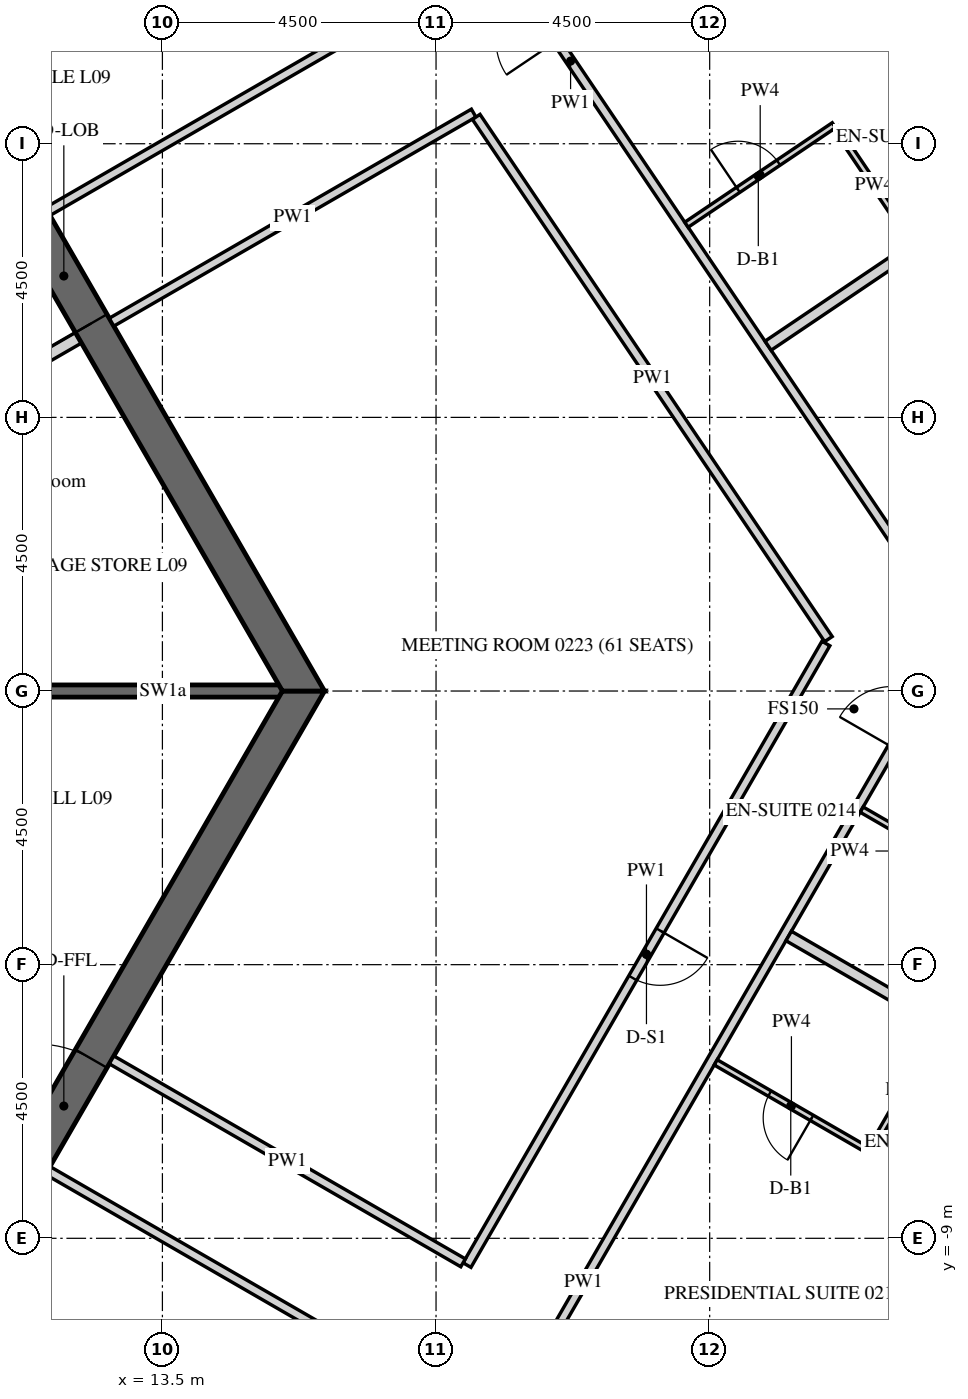
"""IFC4 building model, lengths in metres.
Left out: names, types, materials, properties, quantities, classifications, styles, units other than length and angle.
Written with IfcOpenShell. Run it as: python <this file> out.ifc"""

import sys

from ifc_helpers import new_model, si_unit, direction, frame, frame_2d, origin, place, context, subcontext, project, spatial, polyline, rectangle, outline, extrude, element, fill, save


model = new_model("IFC4")
c1 = context("Model", 3, precision=1e-05, world=origin(), true_north=direction((0.0, 1.0)))
c2 = subcontext(c1, "Body", "Model", "MODEL_VIEW")
j1 = project(units=[si_unit("LENGTHUNIT", "METRE"), si_unit("PLANEANGLEUNIT", "RADIAN")], contexts=[c1])
p1 = place(None, origin())
s1 = spatial("IfcSite", under=j1, at=p1, CompositionType="ELEMENT")
p2 = place(p1, origin())
s2 = spatial("IfcBuilding", under=s1, at=p2, CompositionType="ELEMENT")
p3 = place(p2, frame((0.0, 0.0, 49.2)))
s3 = spatial("IfcBuildingStorey", under=s2, at=p3, CompositionType="ELEMENT", Elevation=49.2)
p4 = place(p3, frame((18.83, -26.835, -0.15), z_axis=(0.0, 0.0, 1.0), x_axis=(0.500003800416, 0.866023209602, 0.0)))
e1 = element("IfcWall", 1, at=p4, inside=s3, PredefinedType="SOLIDWALL", context=c2, shape_type="SweptSolid", body=[
    extrude(outline(polyline([(-0.022, -0.275), (30.097, -0.275), (30.045, 0.275), (0.022, 0.275), (-0.022, -0.275)])), origin(), (0.0, 0.0, 1.0), 3.9),
])
p5 = place(p4, frame((1.236, 0.0, 1.05)))
e2 = element("IfcOpeningElement", 2, at=p5, cuts=e1, PredefinedType="OPENING", context=c2, shape_type="SweptSolid", body=[
    extrude(rectangle(XDim=2.4, YDim=2.4, at=frame_2d((1.2, 1.2))), frame((0.0, 0.285, 0.0), z_axis=(0.0, -1.0, 0.0), x_axis=(1.0, 0.0, 0.0)), (0.0, 0.0, 1.0), 0.57),
])
p6 = place(p4, frame((4.835, 0.0, 1.05)))
e3 = element("IfcOpeningElement", 3, at=p6, cuts=e1, PredefinedType="OPENING", context=c2, shape_type="SweptSolid", body=[
    extrude(rectangle(XDim=2.4, YDim=2.4, at=frame_2d((1.2, 1.2))), frame((0.0, 0.285, 0.0), z_axis=(0.0, -1.0, 0.0), x_axis=(1.0, 0.0, 0.0)), (0.0, 0.0, 1.0), 0.57),
])
p7 = place(p4, frame((8.436, 0.0, 1.05)))
e4 = element("IfcOpeningElement", 4, at=p7, cuts=e1, PredefinedType="OPENING", context=c2, shape_type="SweptSolid", body=[
    extrude(rectangle(XDim=2.4, YDim=2.4, at=frame_2d((1.2, 1.2))), frame((0.0, 0.285, 0.0), z_axis=(0.0, -1.0, 0.0), x_axis=(1.0, 0.0, 0.0)), (0.0, 0.0, 1.0), 0.57),
])
p8 = place(p4, frame((12.035, 0.0, 1.05)))
e5 = element("IfcOpeningElement", 5, at=p8, cuts=e1, PredefinedType="OPENING", context=c2, shape_type="SweptSolid", body=[
    extrude(rectangle(XDim=2.4, YDim=2.4, at=frame_2d((1.2, 1.2))), frame((0.0, 0.285, 0.0), z_axis=(0.0, -1.0, 0.0), x_axis=(1.0, 0.0, 0.0)), (0.0, 0.0, 1.0), 0.57),
])
p9 = place(p4, frame((15.635, 0.0, 1.05)))
e6 = element("IfcOpeningElement", 6, at=p9, cuts=e1, PredefinedType="OPENING", context=c2, shape_type="SweptSolid", body=[
    extrude(rectangle(XDim=2.4, YDim=2.4, at=frame_2d((1.2, 1.2))), frame((0.0, 0.285, 0.0), z_axis=(0.0, -1.0, 0.0), x_axis=(1.0, 0.0, 0.0)), (0.0, 0.0, 1.0), 0.57),
])
p10 = place(p4, frame((19.236, 0.0, 1.05)))
e7 = element("IfcOpeningElement", 7, at=p10, cuts=e1, PredefinedType="OPENING", context=c2, shape_type="SweptSolid", body=[
    extrude(rectangle(XDim=2.4, YDim=2.4, at=frame_2d((1.2, 1.2))), frame((0.0, 0.285, 0.0), z_axis=(0.0, -1.0, 0.0), x_axis=(1.0, 0.0, 0.0)), (0.0, 0.0, 1.0), 0.57),
])
p11 = place(p4, frame((22.835, 0.0, 1.05)))
e8 = element("IfcOpeningElement", 8, at=p11, cuts=e1, PredefinedType="OPENING", context=c2, shape_type="SweptSolid", body=[
    extrude(rectangle(XDim=2.4, YDim=2.4, at=frame_2d((1.2, 1.2))), frame((0.0, 0.285, 0.0), z_axis=(0.0, -1.0, 0.0), x_axis=(1.0, 0.0, 0.0)), (0.0, 0.0, 1.0), 0.57),
])
p12 = place(p4, frame((26.436, 0.0, 1.05)))
e9 = element("IfcOpeningElement", 9, at=p12, cuts=e1, PredefinedType="OPENING", context=c2, shape_type="SweptSolid", body=[
    extrude(rectangle(XDim=2.4, YDim=2.4, at=frame_2d((1.2, 1.2))), frame((0.0, 0.285, 0.0), z_axis=(0.0, -1.0, 0.0), x_axis=(1.0, 0.0, 0.0)), (0.0, 0.0, 1.0), 0.57),
])
p13 = place(p3, frame((33.728, 3.153, -0.15), z_axis=(0.0, 0.0, 1.0), x_axis=(-0.559192411416, 0.82903790445, 0.0)))
e10 = element("IfcWall", 10, at=p13, inside=s3, PredefinedType="SOLIDWALL", context=c2, shape_type="SweptSolid", body=[
    extrude(outline(polyline([(-0.026, -0.275), (30.093, -0.275), (30.048, 0.275), (0.026, 0.275), (-0.026, -0.275)])), origin(), (0.0, 0.0, 1.0), 3.9),
])
p14 = place(p13, frame((1.236, 0.0, 1.05)))
e11 = element("IfcOpeningElement", 11, at=p14, cuts=e10, PredefinedType="OPENING", context=c2, shape_type="SweptSolid", body=[
    extrude(rectangle(XDim=2.4, YDim=2.4, at=frame_2d((1.2, 1.2))), frame((0.0, 0.285, 0.0), z_axis=(0.0, -1.0, 0.0), x_axis=(1.0, 0.0, 0.0)), (0.0, 0.0, 1.0), 0.57),
])
p15 = place(p13, frame((4.835, 0.0, 1.05)))
e12 = element("IfcOpeningElement", 12, at=p15, cuts=e10, PredefinedType="OPENING", context=c2, shape_type="SweptSolid", body=[
    extrude(rectangle(XDim=2.4, YDim=2.4, at=frame_2d((1.2, 1.2))), frame((0.0, 0.285, 0.0), z_axis=(0.0, -1.0, 0.0), x_axis=(1.0, 0.0, 0.0)), (0.0, 0.0, 1.0), 0.57),
])
p16 = place(p13, frame((8.436, 0.0, 1.05)))
e13 = element("IfcOpeningElement", 13, at=p16, cuts=e10, PredefinedType="OPENING", context=c2, shape_type="SweptSolid", body=[
    extrude(rectangle(XDim=2.4, YDim=2.4, at=frame_2d((1.2, 1.2))), frame((0.0, 0.285, 0.0), z_axis=(0.0, -1.0, 0.0), x_axis=(1.0, 0.0, 0.0)), (0.0, 0.0, 1.0), 0.57),
])
p17 = place(p13, frame((12.035, 0.0, 1.05)))
e14 = element("IfcOpeningElement", 14, at=p17, cuts=e10, PredefinedType="OPENING", context=c2, shape_type="SweptSolid", body=[
    extrude(rectangle(XDim=2.4, YDim=2.4, at=frame_2d((1.2, 1.2))), frame((0.0, 0.285, 0.0), z_axis=(0.0, -1.0, 0.0), x_axis=(1.0, 0.0, 0.0)), (0.0, 0.0, 1.0), 0.57),
])
p18 = place(p13, frame((15.635, 0.0, 1.05)))
e15 = element("IfcOpeningElement", 15, at=p18, cuts=e10, PredefinedType="OPENING", context=c2, shape_type="SweptSolid", body=[
    extrude(rectangle(XDim=2.4, YDim=2.4, at=frame_2d((1.2, 1.2))), frame((0.0, 0.285, 0.0), z_axis=(0.0, -1.0, 0.0), x_axis=(1.0, 0.0, 0.0)), (0.0, 0.0, 1.0), 0.57),
])
p19 = place(p13, frame((19.236, 0.0, 1.05)))
e16 = element("IfcOpeningElement", 16, at=p19, cuts=e10, PredefinedType="OPENING", context=c2, shape_type="SweptSolid", body=[
    extrude(rectangle(XDim=2.4, YDim=2.4, at=frame_2d((1.2, 1.2))), frame((0.0, 0.285, 0.0), z_axis=(0.0, -1.0, 0.0), x_axis=(1.0, 0.0, 0.0)), (0.0, 0.0, 1.0), 0.57),
])
p20 = place(p13, frame((22.835, 0.0, 1.05)))
e17 = element("IfcOpeningElement", 17, at=p20, cuts=e10, PredefinedType="OPENING", context=c2, shape_type="SweptSolid", body=[
    extrude(rectangle(XDim=2.4, YDim=2.4, at=frame_2d((1.2, 1.2))), frame((0.0, 0.285, 0.0), z_axis=(0.0, -1.0, 0.0), x_axis=(1.0, 0.0, 0.0)), (0.0, 0.0, 1.0), 0.57),
])
p21 = place(p13, frame((26.436, 0.0, 1.05)))
e18 = element("IfcOpeningElement", 18, at=p21, cuts=e10, PredefinedType="OPENING", context=c2, shape_type="SweptSolid", body=[
    extrude(rectangle(XDim=2.4, YDim=2.4, at=frame_2d((1.2, 1.2))), frame((0.0, 0.285, 0.0), z_axis=(0.0, -1.0, 0.0), x_axis=(1.0, 0.0, 0.0)), (0.0, 0.0, 1.0), 0.57),
])
p22 = place(p3, frame((7.91, -13.7, -0.15), z_axis=(0.0, 0.0, 1.0), x_axis=(0.499999880136, 0.866025472988, 0.0)))
e19 = element("IfcWall", 19, at=p22, inside=s3, PredefinedType="SHEAR", context=c2, shape_type="SweptSolid", body=[
    extrude(outline(polyline([(-0.173, -0.3), (15.993, -0.3), (15.646, 0.3), (0.173, 0.3), (-0.173, -0.3)])), origin(), (0.0, 0.0, 1.0), 3.9),
])
p23 = place(p22, frame((7.039, 0.0, 0.15)))
e20 = element("IfcOpeningElement", 20, at=p23, cuts=e19, PredefinedType="OPENING", context=c2, shape_type="SweptSolid", body=[
    extrude(rectangle(XDim=1.8, YDim=2.4, at=frame_2d((0.9, 1.2))), frame((0.0, 0.31, 0.0), z_axis=(0.0, -1.0, 0.0), x_axis=(1.0, 0.0, 0.0)), (0.0, 0.0, 1.0), 0.62),
])
p24 = place(p3, frame((15.819, 0.0, -0.15), z_axis=(0.0, 0.0, 1.0), x_axis=(-0.499999880136, 0.866025472988, 0.0)))
e21 = element("IfcWall", 21, at=p24, inside=s3, PredefinedType="SHEAR", context=c2, shape_type="SweptSolid", body=[
    extrude(outline(polyline([(-0.173, -0.3), (15.993, -0.3), (15.646, 0.3), (0.173, 0.3), (-0.173, -0.3)])), origin(), (0.0, 0.0, 1.0), 3.9),
])
p25 = place(p24, frame((6.981, 0.0, 0.15)))
e22 = element("IfcOpeningElement", 22, at=p25, cuts=e21, PredefinedType="OPENING", context=c2, shape_type="SweptSolid", body=[
    extrude(rectangle(XDim=1.8, YDim=2.4, at=frame_2d((0.9, 1.2))), frame((0.0, 0.31, 0.0), z_axis=(0.0, -1.0, 0.0), x_axis=(1.0, 0.0, 0.0)), (0.0, 0.0, 1.0), 0.62),
])
p26 = place(p3, frame((11.547, 0.0, -0.15), z_axis=(0.0, 0.0, 1.0), x_axis=(1.0, 0.0, 0.0)))
e23 = element("IfcWall", 23, at=p26, inside=s3, PredefinedType="SHEAR", context=c2, shape_type="SweptSolid", body=[
    extrude(rectangle(XDim=3.926, YDim=0.2, at=frame_2d((1.963, 0.0))), origin(), (0.0, 0.0, 1.0), 3.9),
])
p27 = place(p3, frame((9.175, 4.109, 0.0), z_axis=(0.0, 0.0, 1.0), x_axis=(0.865989465428, 0.500062241894, 0.0)))
e24 = element("IfcWall", 24, at=p27, inside=s3, PredefinedType="PARTITIONING", context=c2, shape_type="SweptSolid", body=[
    extrude(rectangle(XDim=3.4, YDim=0.2, at=frame_2d((1.7, 0.0))), origin(), (0.0, 0.0, 1.0), 3.65),
])
p28 = place(p27, frame((1.351, 0.0, 0.0)))
e25 = element("IfcOpeningElement", 25, at=p28, cuts=e24, PredefinedType="OPENING", context=c2, shape_type="SweptSolid", body=[
    extrude(rectangle(XDim=0.9, YDim=2.1, at=frame_2d((0.45, 1.05))), frame((0.0, 0.11, 0.0), z_axis=(0.0, -1.0, 0.0), x_axis=(1.0, 0.0, 0.0)), (0.0, 0.0, 1.0), 0.22),
])
p29 = place(p3, frame((14.275, -20.375, 0.0), z_axis=(0.0, 0.0, 1.0), x_axis=(0.500001098408, 0.866024769617, 0.0)))
e26 = element("IfcWall", 26, at=p29, inside=s3, PredefinedType="PARTITIONING", context=c2, shape_type="SweptSolid", body=[
    extrude(rectangle(XDim=24.599, YDim=0.15, at=frame_2d((12.299, 0.0))), origin(), (0.0, 0.0, 1.0), 2.988),
])
p30 = place(p29, frame((3.016, 0.0, 0.0)))
e27 = element("IfcOpeningElement", 27, at=p30, cuts=e26, PredefinedType="OPENING", context=c2, shape_type="SweptSolid", body=[
    extrude(rectangle(XDim=1.0, YDim=2.1, at=frame_2d((0.5, 1.05))), frame((0.0, 0.085, 0.0), z_axis=(0.0, -1.0, 0.0), x_axis=(1.0, 0.0, 0.0)), (0.0, 0.0, 1.0), 0.17),
])
p31 = place(p29, frame((10.019, 0.0, 0.0)))
e28 = element("IfcOpeningElement", 28, at=p31, cuts=e26, PredefinedType="OPENING", context=c2, shape_type="SweptSolid", body=[
    extrude(rectangle(XDim=1.0, YDim=2.1, at=frame_2d((0.5, 1.05))), frame((0.0, 0.085, 0.0), z_axis=(0.0, -1.0, 0.0), x_axis=(1.0, 0.0, 0.0)), (0.0, 0.0, 1.0), 0.17),
])
p32 = place(p29, frame((22.459, 0.0, 0.0)))
e29 = element("IfcOpeningElement", 29, at=p32, cuts=e26, PredefinedType="OPENING", context=c2, shape_type="SweptSolid", body=[
    extrude(rectangle(XDim=1.0, YDim=2.1, at=frame_2d((0.5, 1.05))), frame((0.0, 0.085, 0.0), z_axis=(0.0, -1.0, 0.0), x_axis=(1.0, 0.0, 0.0)), (0.0, 0.0, 1.0), 0.17),
])
p33 = place(p3, frame((26.528, 0.997, 0.0), z_axis=(0.0, 0.0, 1.0), x_axis=(-0.559192121846, 0.829038099767, 0.0)))
e30 = element("IfcWall", 30, at=p33, inside=s3, PredefinedType="PARTITIONING", context=c2, shape_type="SweptSolid", body=[
    extrude(rectangle(XDim=22.586, YDim=0.15, at=frame_2d((11.293, 0.0))), origin(), (0.0, 0.0, 1.0), 2.988),
])
p34 = place(p33, frame((11.696, 0.0, 0.0)))
e31 = element("IfcOpeningElement", 31, at=p34, cuts=e30, PredefinedType="OPENING", context=c2, shape_type="SweptSolid", body=[
    extrude(rectangle(XDim=1.0, YDim=2.1, at=frame_2d((0.5, 1.05))), frame((0.0, 0.085, 0.0), z_axis=(0.0, -1.0, 0.0), x_axis=(1.0, 0.0, 0.0)), (0.0, 0.0, 1.0), 0.17),
])
p35 = place(p33, frame((17.733, 0.0, 0.0)))
e32 = element("IfcOpeningElement", 32, at=p35, cuts=e30, PredefinedType="OPENING", context=c2, shape_type="SweptSolid", body=[
    extrude(rectangle(XDim=1.0, YDim=2.1, at=frame_2d((0.5, 1.05))), frame((0.0, 0.085, 0.0), z_axis=(0.0, -1.0, 0.0), x_axis=(1.0, 0.0, 0.0)), (0.0, 0.0, 1.0), 0.17),
])
p36 = place(p3, frame((12.664, 6.066, 0.0), z_axis=(0.0, 0.0, 1.0), x_axis=(0.866027716353, 0.499995994493, 0.0)))
e33 = element("IfcWall", 33, at=p36, inside=s3, PredefinedType="PARTITIONING", context=c2, shape_type="SweptSolid", body=[
    extrude(rectangle(XDim=6.876, YDim=0.15, at=frame_2d((3.438, 0.0))), origin(), (0.0, 0.0, 1.0), 2.988),
])
p37 = place(p3, frame((18.661, 9.441, 0.0), z_axis=(0.0, 0.0, 1.0), x_axis=(0.559206469148, -0.829028422229, 0.0)))
e34 = element("IfcWall", 34, at=p37, inside=s3, PredefinedType="PARTITIONING", context=c2, shape_type="SweptSolid", body=[
    extrude(rectangle(XDim=10.358, YDim=0.15, at=frame_2d((5.179, 0.0))), origin(), (0.0, 0.0, 1.0), 2.988),
])
p38 = place(p3, frame((24.411, 0.782, 0.0), z_axis=(0.0, 0.0, 1.0), x_axis=(-0.499996383721, -0.866027491634, 0.0)))
e35 = element("IfcWall", 35, at=p38, inside=s3, PredefinedType="PARTITIONING", context=c2, shape_type="SweptSolid", body=[
    extrude(rectangle(XDim=11.804, YDim=0.15, at=frame_2d((5.902, 0.0))), origin(), (0.0, 0.0, 1.0), 2.988),
])
p39 = place(p38, frame((5.452, 0.0, 0.0)))
e36 = element("IfcOpeningElement", 36, at=p39, cuts=e35, PredefinedType="OPENING", context=c2, shape_type="SweptSolid", body=[
    extrude(rectangle(XDim=0.9, YDim=2.1, at=frame_2d((0.45, 1.05))), frame((0.0, 0.085, 0.0), z_axis=(0.0, -1.0, 0.0), x_axis=(1.0, 0.0, 0.0)), (0.0, 0.0, 1.0), 0.17),
])
p40 = place(p3, frame((18.445, -9.403, 0.0), z_axis=(0.0, 0.0, 1.0), x_axis=(-0.866033317326, 0.499986293093, 0.0)))
e37 = element("IfcWall", 37, at=p40, inside=s3, PredefinedType="PARTITIONING", context=c2, shape_type="SweptSolid", body=[
    extrude(rectangle(XDim=6.675, YDim=0.15, at=frame_2d((3.337, 0.0))), origin(), (0.0, 0.0, 1.0), 2.988),
])
p41 = place(p3, frame((11.614, -7.884, 0.0), z_axis=(0.0, 0.0, 1.0), x_axis=(0.866026575979, -0.499997969693, 0.0)))
e38 = element("IfcWall", 38, at=p41, inside=s3, PredefinedType="PARTITIONING", context=c2, shape_type="SweptSolid", body=[
    extrude(rectangle(XDim=6.75, YDim=0.15, at=frame_2d((3.375, 0.0))), origin(), (0.0, 0.0, 1.0), 2.988),
])
p42 = place(p3, frame((17.376, 11.211, 0.0), z_axis=(0.0, 0.0, 1.0), x_axis=(-0.866021841149, -0.500006170614, 0.0)))
e39 = element("IfcWall", 39, at=p42, inside=s3, PredefinedType="PARTITIONING", context=c2, shape_type="SweptSolid", body=[
    extrude(rectangle(XDim=6.654, YDim=0.15, at=frame_2d((3.327, 0.0))), origin(), (0.0, 0.0, 1.0), 2.988),
])
p43 = place(p3, frame((26.288, -5.569, 0.0), z_axis=(0.0, 0.0, 1.0), x_axis=(-0.500015210774, -0.866016621662, 0.0)))
e40 = element("IfcWall", 40, at=p43, inside=s3, PredefinedType="PARTITIONING", context=c2, shape_type="SweptSolid", body=[
    extrude(rectangle(XDim=2.31, YDim=0.1, at=frame_2d((1.155, 0.0))), origin(), (0.0, 0.0, 1.0), 2.988),
])
p44 = place(p3, frame((25.089, -7.544, 0.0), z_axis=(0.0, 0.0, 1.0), x_axis=(-0.866018712932, 0.500011588718, 0.0)))
e41 = element("IfcWall", 41, at=p44, inside=s3, PredefinedType="PARTITIONING", context=c2, shape_type="SweptSolid", body=[
    extrude(rectangle(XDim=2.875, YDim=0.1, at=frame_2d((1.438, 0.0))), origin(), (0.0, 0.0, 1.0), 2.988),
])
p45 = place(p44, frame((1.05, 0.0, 0.0)))
e42 = element("IfcOpeningElement", 42, at=p45, cuts=e41, PredefinedType="OPENING", context=c2, shape_type="SweptSolid", body=[
    extrude(rectangle(XDim=0.8, YDim=2.1, at=frame_2d((0.4, 1.05))), frame((0.0, 0.06, 0.0), z_axis=(0.0, -1.0, 0.0), x_axis=(1.0, 0.0, 0.0)), (0.0, 0.0, 1.0), 0.12),
])
p46 = place(p3, frame((29.71, -7.441, 0.0), z_axis=(0.0, 0.0, 1.0), x_axis=(-0.866019982719, 0.500009389444, 0.0)))
e43 = element("IfcWall", 43, at=p46, inside=s3, PredefinedType="PARTITIONING", context=c2, shape_type="SweptSolid", body=[
    extrude(rectangle(XDim=6.825, YDim=0.18, at=frame_2d((3.413, 0.0))), origin(), (0.0, 0.0, 1.0), 2.988),
])
p47 = place(p3, frame((24.999, -1.95, 0.0), z_axis=(0.0, 0.0, 1.0), x_axis=(0.866073700213, -0.499916338801, 0.0)))
e44 = element("IfcWall", 44, at=p47, inside=s3, PredefinedType="PARTITIONING", context=c2, shape_type="SweptSolid", body=[
    extrude(rectangle(XDim=2.725, YDim=0.1, at=frame_2d((1.363, 0.0))), origin(), (0.0, 0.0, 1.0), 2.988),
])
p48 = place(p47, frame((0.925, 0.0, 0.0)))
e45 = element("IfcOpeningElement", 45, at=p48, cuts=e44, PredefinedType="OPENING", context=c2, shape_type="SweptSolid", body=[
    extrude(rectangle(XDim=0.8, YDim=2.1, at=frame_2d((0.4, 1.05))), frame((0.0, 0.06, 0.0), z_axis=(0.0, -1.0, 0.0), x_axis=(1.0, 0.0, 0.0)), (0.0, 0.0, 1.0), 0.12),
])
p49 = place(p3, frame((29.119, 9.495, 0.0), z_axis=(0.0, 0.0, 1.0), x_axis=(-0.829044361536, -0.559182838261, 0.0)))
e46 = element("IfcWall", 46, at=p49, inside=s3, PredefinedType="PARTITIONING", context=c2, shape_type="SweptSolid", body=[
    extrude(rectangle(XDim=6.825, YDim=0.18, at=frame_2d((3.413, 0.0))), origin(), (0.0, 0.0, 1.0), 2.988),
])
p50 = place(p3, frame((22.118, 7.668, 0.0), z_axis=(0.0, 0.0, 1.0), x_axis=(0.829007334469, 0.559237730663, 0.0)))
e47 = element("IfcWall", 47, at=p50, inside=s3, PredefinedType="PARTITIONING", context=c2, shape_type="SweptSolid", body=[
    extrude(rectangle(XDim=2.925, YDim=0.1, at=frame_2d((1.462, 0.0))), origin(), (0.0, 0.0, 1.0), 2.988),
])
p51 = place(p50, frame((1.025, 0.0, 0.0)))
e48 = element("IfcOpeningElement", 48, at=p51, cuts=e47, PredefinedType="OPENING", context=c2, shape_type="SweptSolid", body=[
    extrude(rectangle(XDim=0.8, YDim=2.1, at=frame_2d((0.4, 1.05))), frame((0.0, 0.06, 0.0), z_axis=(0.0, -1.0, 0.0), x_axis=(1.0, 0.0, 0.0)), (0.0, 0.0, 1.0), 0.12),
])
p52 = place(p3, frame((24.571, 9.262, 0.0), z_axis=(0.0, 0.0, 1.0), x_axis=(0.559179660023, -0.829046505219, 0.0)))
e49 = element("IfcWall", 49, at=p52, inside=s3, PredefinedType="PARTITIONING", context=c2, shape_type="SweptSolid", body=[
    extrude(rectangle(XDim=2.26, YDim=0.1, at=frame_2d((1.13, 0.0))), origin(), (0.0, 0.0, 1.0), 2.988),
])
p53 = place(p25, origin())
e50 = element("IfcDoor", 50, at=p53, inside=s3, OperationType="DOUBLE_DOOR_SINGLE_SWING", PredefinedType="DOOR", context=c2, shape_type="SweptSolid", body=[
    extrude(rectangle(XDim=1.8, YDim=2.4, at=frame_2d((0.9, 1.2))), frame((0.0, 0.025, 0.0), z_axis=(0.0, -1.0, 0.0), x_axis=(1.0, 0.0, 0.0)), (0.0, 0.0, 1.0), 0.05),
])
fill(e22, e50)
p54 = place(p23, origin())
e51 = element("IfcDoor", 51, at=p54, inside=s3, OperationType="DOUBLE_DOOR_SINGLE_SWING", PredefinedType="DOOR", context=c2, shape_type="SweptSolid", body=[
    extrude(rectangle(XDim=1.8, YDim=2.4, at=frame_2d((0.9, 1.2))), frame((0.0, 0.025, 0.0), z_axis=(0.0, -1.0, 0.0), x_axis=(1.0, 0.0, 0.0)), (0.0, 0.0, 1.0), 0.05),
])
fill(e20, e51)
p55 = place(p45, origin())
e52 = element("IfcDoor", 52, at=p55, inside=s3, OperationType="SINGLE_SWING_LEFT", PredefinedType="DOOR", context=c2, shape_type="SweptSolid", body=[
    extrude(rectangle(XDim=0.8, YDim=2.1, at=frame_2d((0.4, 1.05))), frame((0.0, 0.025, 0.0), z_axis=(0.0, -1.0, 0.0), x_axis=(1.0, 0.0, 0.0)), (0.0, 0.0, 1.0), 0.05),
])
fill(e42, e52)
p56 = place(p51, origin())
e53 = element("IfcDoor", 53, at=p56, inside=s3, OperationType="SINGLE_SWING_RIGHT", PredefinedType="DOOR", context=c2, shape_type="SweptSolid", body=[
    extrude(rectangle(XDim=0.8, YDim=2.1, at=frame_2d((0.4, 1.05))), frame((0.0, 0.025, 0.0), z_axis=(0.0, -1.0, 0.0), x_axis=(1.0, 0.0, 0.0)), (0.0, 0.0, 1.0), 0.05),
])
fill(e48, e53)
p57 = place(p39, origin())
e54 = element("IfcDoor", 54, at=p57, inside=s3, OperationType="SINGLE_SWING_RIGHT", PredefinedType="DOOR", context=c2, shape_type="SweptSolid", body=[
    extrude(rectangle(XDim=0.9, YDim=2.1, at=frame_2d((0.45, 1.05))), frame((0.0, 0.025, 0.0), z_axis=(0.0, -1.0, 0.0), x_axis=(1.0, 0.0, 0.0)), (0.0, 0.0, 1.0), 0.05),
])
fill(e36, e54)
save(model, sys.argv[1])
